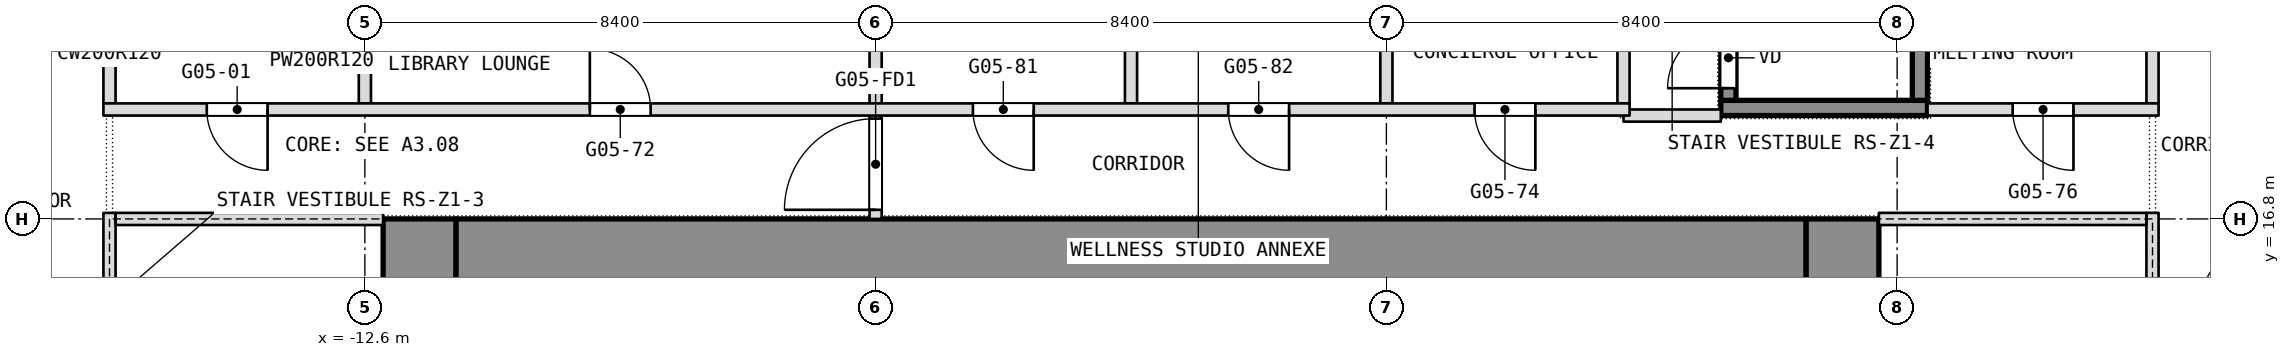
"""IFC4 building model, lengths in metres.
Left out: names, types, materials, properties, quantities, classifications, styles, units other than length and angle.
Written with IfcOpenShell. Run it as: python <this file> out.ifc"""

import sys

from ifc_helpers import new_model, si_unit, direction, frame, frame_2d, origin, place, context, subcontext, project, spatial, rectangle, extrude, element, fill, save


model = new_model("IFC4")
c1 = context("Model", 3, precision=1e-05, world=origin(), true_north=direction((0.0, 1.0)))
c2 = subcontext(c1, "Body", "Model", "MODEL_VIEW")
j1 = project(units=[si_unit("LENGTHUNIT", "METRE"), si_unit("PLANEANGLEUNIT", "RADIAN")], contexts=[c1])
p1 = place(None, origin())
s1 = spatial("IfcSite", under=j1, at=p1, CompositionType="ELEMENT")
p2 = place(p1, origin())
s2 = spatial("IfcBuilding", under=s1, at=p2, CompositionType="ELEMENT")
p3 = place(p2, frame((0.0, 0.0, 68.9)))
s3 = spatial("IfcBuildingStorey", under=s2, at=p3, CompositionType="ELEMENT", Elevation=68.9)
p4 = place(p3, frame((11.7, 0.0, 0.0), z_axis=(0.0, 0.0, 1.0), x_axis=(0.0, 1.0, 0.0)))
e1 = element("IfcWall", 1, at=p4, inside=s3, PredefinedType="SHEAR", context=c2, shape_type="SweptSolid", body=[
    extrude(rectangle(XDim=16.8, YDim=1.2, at=frame_2d((8.4, 0.0))), origin(), (0.0, 0.0, 1.0), 3.6),
])
p5 = place(p4, frame((3.6, 0.0, 0.0)))
e2 = element("IfcOpeningElement", 2, at=p5, cuts=e1, PredefinedType="OPENING", context=c2, shape_type="SweptSolid", body=[
    extrude(rectangle(XDim=0.9, YDim=2.1, at=frame_2d((0.45, 1.05))), frame((0.0, 0.6, 0.0), z_axis=(0.0, -1.0, 0.0), x_axis=(1.0, 0.0, 0.0)), (0.0, 0.0, 1.0), 1.2),
])
p6 = place(p4, frame((6.825, 0.0, 0.0)))
e3 = element("IfcOpeningElement", 3, at=p6, cuts=e1, PredefinedType="OPENING", context=c2, shape_type="SweptSolid", body=[
    extrude(rectangle(XDim=1.2, YDim=2.1, at=frame_2d((0.6, 1.05))), frame((0.0, 0.6, 0.0), z_axis=(0.0, -1.0, 0.0), x_axis=(1.0, 0.0, 0.0)), (0.0, 0.0, 1.0), 1.2),
])
p7 = place(p4, frame((14.137, 0.0, 0.0)))
e4 = element("IfcOpeningElement", 4, at=p7, cuts=e1, PredefinedType="OPENING", context=c2, shape_type="SweptSolid", body=[
    extrude(rectangle(XDim=0.9, YDim=2.1, at=frame_2d((0.45, 1.05))), frame((0.0, 0.6, 0.0), z_axis=(0.0, -1.0, 0.0), x_axis=(1.0, 0.0, 0.0)), (0.0, 0.0, 1.0), 1.2),
])
p8 = place(p4, frame((11.512, 0.0, 0.0)))
e5 = element("IfcOpeningElement", 5, at=p8, cuts=e1, PredefinedType="OPENING", context=c2, shape_type="SweptSolid", body=[
    extrude(rectangle(XDim=0.9, YDim=2.1, at=frame_2d((0.45, 1.05))), frame((0.0, 0.6, 0.0), z_axis=(0.0, -1.0, 0.0), x_axis=(1.0, 0.0, 0.0)), (0.0, 0.0, 1.0), 1.2),
])
p9 = place(p4, frame((8.775, 0.0, 0.0)))
e6 = element("IfcOpeningElement", 6, at=p9, cuts=e1, PredefinedType="OPENING", context=c2, shape_type="SweptSolid", body=[
    extrude(rectangle(XDim=1.2, YDim=2.1, at=frame_2d((0.6, 1.05))), frame((0.0, 0.6, 0.0), z_axis=(0.0, -1.0, 0.0), x_axis=(1.0, 0.0, 0.0)), (0.0, 0.0, 1.0), 1.2),
])
p10 = place(p3, frame((-11.7, 0.0, 0.0), z_axis=(0.0, 0.0, 1.0), x_axis=(0.0, 1.0, 0.0)))
e7 = element("IfcWall", 7, at=p10, inside=s3, PredefinedType="SHEAR", context=c2, shape_type="SweptSolid", body=[
    extrude(rectangle(XDim=16.8, YDim=1.2, at=frame_2d((8.4, 0.0))), origin(), (0.0, 0.0, 1.0), 3.6),
])
p11 = place(p10, frame((2.3, 0.0, 0.0)))
e8 = element("IfcOpeningElement", 8, at=p11, cuts=e7, PredefinedType="OPENING", context=c2, shape_type="SweptSolid", body=[
    extrude(rectangle(XDim=1.1, YDim=2.1, at=frame_2d((0.55, 1.05))), frame((0.0, 0.6, 0.0), z_axis=(0.0, -1.0, 0.0), x_axis=(1.0, 0.0, 0.0)), (0.0, 0.0, 1.0), 1.2),
])
p12 = place(p10, frame((4.85, 0.0, 0.0)))
e9 = element("IfcOpeningElement", 9, at=p12, cuts=e7, PredefinedType="OPENING", context=c2, shape_type="SweptSolid", body=[
    extrude(rectangle(XDim=1.1, YDim=2.1, at=frame_2d((0.55, 1.05))), frame((0.0, 0.6, 0.0), z_axis=(0.0, -1.0, 0.0), x_axis=(1.0, 0.0, 0.0)), (0.0, 0.0, 1.0), 1.2),
])
p13 = place(p10, frame((6.825, 0.0, 0.0)))
e10 = element("IfcOpeningElement", 10, at=p13, cuts=e7, PredefinedType="OPENING", context=c2, shape_type="SweptSolid", body=[
    extrude(rectangle(XDim=1.2, YDim=2.1, at=frame_2d((0.6, 1.05))), frame((0.0, 0.6, 0.0), z_axis=(0.0, -1.0, 0.0), x_axis=(1.0, 0.0, 0.0)), (0.0, 0.0, 1.0), 1.2),
])
p14 = place(p10, frame((13.4, 0.0, 0.0)))
e11 = element("IfcOpeningElement", 11, at=p14, cuts=e7, PredefinedType="OPENING", context=c2, shape_type="SweptSolid", body=[
    extrude(rectangle(XDim=1.1, YDim=2.1, at=frame_2d((0.55, 1.05))), frame((0.0, 0.6, 0.0), z_axis=(0.0, -1.0, 0.0), x_axis=(1.0, 0.0, 0.0)), (0.0, 0.0, 1.0), 1.2),
])
p15 = place(p10, frame((10.85, 0.0, 0.0)))
e12 = element("IfcOpeningElement", 12, at=p15, cuts=e7, PredefinedType="OPENING", context=c2, shape_type="SweptSolid", body=[
    extrude(rectangle(XDim=1.1, YDim=2.1, at=frame_2d((0.55, 1.05))), frame((0.0, 0.6, 0.0), z_axis=(0.0, -1.0, 0.0), x_axis=(1.0, 0.0, 0.0)), (0.0, 0.0, 1.0), 1.2),
])
p16 = place(p10, frame((8.775, 0.0, 0.0)))
e13 = element("IfcOpeningElement", 13, at=p16, cuts=e7, PredefinedType="OPENING", context=c2, shape_type="SweptSolid", body=[
    extrude(rectangle(XDim=1.2, YDim=2.1, at=frame_2d((0.6, 1.05))), frame((0.0, 0.6, 0.0), z_axis=(0.0, -1.0, 0.0), x_axis=(1.0, 0.0, 0.0)), (0.0, 0.0, 1.0), 1.2),
])
p17 = place(p3, frame((-11.1, 16.2, 0.0), z_axis=(0.0, 0.0, 1.0), x_axis=(1.0, 0.0, 0.0)))
e14 = element("IfcWall", 14, at=p17, inside=s3, PredefinedType="SHEAR", context=c2, shape_type="SweptSolid", body=[
    extrude(rectangle(XDim=22.2, YDim=1.2, at=frame_2d((11.1, 0.0))), origin(), (0.0, 0.0, 1.0), 3.6),
])
p18 = place(p3, frame((16.8, 18.7, 0.0), z_axis=(0.0, 0.0, 1.0), x_axis=(0.0, 1.0, 0.0)))
e15 = element("IfcWall", 15, at=p18, inside=s3, PredefinedType="PARTITIONING", context=c2, shape_type="SweptSolid", body=[
    extrude(rectangle(XDim=3.0, YDim=0.2, at=frame_2d((1.5, 0.0))), origin(), (0.0, 0.0, 1.0), 3.34),
])
for number, where, z_axis, x_axis in (
    (16, (8.1, 18.7, 0.0), (0.0, 0.0, 1.0), (0.0, 1.0, 0.0)),
    (17, (4.2, 18.7, 0.0), (0.0, 0.0, 1.0), (0.0, 1.0, 0.0)),
    (18, (0.0, 18.7, 0.0), (0.0, 0.0, 1.0), (0.0, 1.0, 0.0)),
):
    element("IfcWall", number, at=place(p3, frame(where, z_axis=z_axis, x_axis=x_axis)), inside=s3, PredefinedType="PARTITIONING", context=c2, shape_type="SweptSolid", body=[
        extrude(rectangle(XDim=2.8, YDim=0.2, at=frame_2d((1.4, 0.0))), origin(), (0.0, 0.0, 1.0), 3.34),
    ])
p19 = place(p3, frame((-4.2, 16.8, 0.0), z_axis=(0.0, 0.0, 1.0), x_axis=(0.0, 1.0, 0.0)))
e19 = element("IfcWall", 19, at=p19, inside=s3, PredefinedType="PARTITIONING", context=c2, shape_type="SweptSolid", body=[
    extrude(rectangle(XDim=6.7, YDim=0.2, at=frame_2d((3.35, 0.0))), origin(), (0.0, 0.0, 1.0), 3.34),
])
p20 = place(p19, frame((0.15, 0.0, 0.0)))
e20 = element("IfcOpeningElement", 20, at=p20, cuts=e19, PredefinedType="OPENING", context=c2, shape_type="SweptSolid", body=[
    extrude(rectangle(XDim=1.5, YDim=2.1, at=frame_2d((0.75, 1.05))), frame((0.0, 0.1, 0.0), z_axis=(0.0, -1.0, 0.0), x_axis=(1.0, 0.0, 0.0)), (0.0, 0.0, 1.0), 0.2),
])
p21 = place(p19, frame((4.95, 0.0, 0.0)))
e21 = element("IfcOpeningElement", 21, at=p21, cuts=e19, PredefinedType="OPENING", context=c2, shape_type="SweptSolid", body=[
    extrude(rectangle(XDim=1.5, YDim=2.1, at=frame_2d((0.75, 1.05))), frame((0.0, 0.1, 0.0), z_axis=(0.0, -1.0, 0.0), x_axis=(1.0, 0.0, 0.0)), (0.0, 0.0, 1.0), 0.2),
])
p22 = place(p3, frame((-12.6, 18.7, 0.0), z_axis=(0.0, 0.0, 1.0), x_axis=(0.0, 1.0, 0.0)))
e22 = element("IfcWall", 22, at=p22, inside=s3, PredefinedType="PARTITIONING", context=c2, shape_type="SweptSolid", body=[
    extrude(rectangle(XDim=2.8, YDim=0.2, at=frame_2d((1.4, 0.0))), origin(), (0.0, 0.0, 1.0), 3.34),
])
p23 = place(p3, frame((-16.8, 18.7, 0.0), z_axis=(0.0, 0.0, 1.0), x_axis=(0.0, 1.0, 0.0)))
e23 = element("IfcWall", 23, at=p23, inside=s3, PredefinedType="PARTITIONING", context=c2, shape_type="SweptSolid", body=[
    extrude(rectangle(XDim=3.0, YDim=0.2, at=frame_2d((1.5, 0.0))), origin(), (0.0, 0.0, 1.0), 3.34),
])
p24 = place(p3, frame((8.1, 18.5, 0.0), z_axis=(0.0, 0.0, 1.0), x_axis=(1.0, 0.0, 0.0)))
e24 = element("IfcWall", 24, at=p24, inside=s3, PredefinedType="PARTITIONING", context=c2, shape_type="SweptSolid", body=[
    extrude(rectangle(XDim=1.6, YDim=0.2, at=frame_2d((0.8, 0.0))), origin(), (0.0, 0.0, 1.0), 3.34),
])
p25 = place(p3, frame((-16.9, 18.6, 0.0), z_axis=(0.0, 0.0, 1.0), x_axis=(1.0, 0.0, 0.0)))
e25 = element("IfcWall", 25, at=p25, inside=s3, PredefinedType="PARTITIONING", context=c2, shape_type="SweptSolid", body=[
    extrude(rectangle(XDim=25.1, YDim=0.2, at=frame_2d((12.55, 0.0))), origin(), (0.0, 0.0, 1.0), 3.34),
])
p26 = place(p25, frame((1.7, 0.0, 0.0)))
e26 = element("IfcOpeningElement", 26, at=p26, cuts=e25, PredefinedType="OPENING", context=c2, shape_type="SweptSolid", body=[
    extrude(rectangle(XDim=1.0, YDim=2.1, at=frame_2d((0.5, 1.05))), frame((0.0, 0.1, 0.0), z_axis=(0.0, -1.0, 0.0), x_axis=(1.0, 0.0, 0.0)), (0.0, 0.0, 1.0), 0.2),
])
p27 = place(p25, frame((8.0, 0.0, 0.0)))
e27 = element("IfcOpeningElement", 27, at=p27, cuts=e25, PredefinedType="OPENING", context=c2, shape_type="SweptSolid", body=[
    extrude(rectangle(XDim=1.0, YDim=2.1, at=frame_2d((0.5, 1.05))), frame((0.0, 0.1, 0.0), z_axis=(0.0, -1.0, 0.0), x_axis=(1.0, 0.0, 0.0)), (0.0, 0.0, 1.0), 0.2),
])
p28 = place(p25, frame((22.55, 0.0, 0.0)))
e28 = element("IfcOpeningElement", 28, at=p28, cuts=e25, PredefinedType="OPENING", context=c2, shape_type="SweptSolid", body=[
    extrude(rectangle(XDim=1.0, YDim=2.1, at=frame_2d((0.5, 1.05))), frame((0.0, 0.1, 0.0), z_axis=(0.0, -1.0, 0.0), x_axis=(1.0, 0.0, 0.0)), (0.0, 0.0, 1.0), 0.2),
])
p29 = place(p25, frame((14.3, 0.0, 0.0)))
e29 = element("IfcOpeningElement", 29, at=p29, cuts=e25, PredefinedType="OPENING", context=c2, shape_type="SweptSolid", body=[
    extrude(rectangle(XDim=1.0, YDim=2.1, at=frame_2d((0.5, 1.05))), frame((0.0, 0.1, 0.0), z_axis=(0.0, -1.0, 0.0), x_axis=(1.0, 0.0, 0.0)), (0.0, 0.0, 1.0), 0.2),
])
p30 = place(p25, frame((18.5, 0.0, 0.0)))
e30 = element("IfcOpeningElement", 30, at=p30, cuts=e25, PredefinedType="OPENING", context=c2, shape_type="SweptSolid", body=[
    extrude(rectangle(XDim=1.0, YDim=2.1, at=frame_2d((0.5, 1.05))), frame((0.0, 0.1, 0.0), z_axis=(0.0, -1.0, 0.0), x_axis=(1.0, 0.0, 0.0)), (0.0, 0.0, 1.0), 0.2),
])
p31 = place(p3, frame((13.1, 18.6, 0.0), z_axis=(0.0, 0.0, 1.0), x_axis=(1.0, 0.0, 0.0)))
e31 = element("IfcWall", 31, at=p31, inside=s3, PredefinedType="PARTITIONING", context=c2, shape_type="SweptSolid", body=[
    extrude(rectangle(XDim=3.8, YDim=0.2, at=frame_2d((1.9, 0.0))), origin(), (0.0, 0.0, 1.0), 3.34),
])
p32 = place(p31, frame((1.4, 0.0, 0.0)))
e32 = element("IfcOpeningElement", 32, at=p32, cuts=e31, PredefinedType="OPENING", context=c2, shape_type="SweptSolid", body=[
    extrude(rectangle(XDim=1.0, YDim=2.1, at=frame_2d((0.5, 1.05))), frame((0.0, 0.1, 0.0), z_axis=(0.0, -1.0, 0.0), x_axis=(1.0, 0.0, 0.0)), (0.0, 0.0, 1.0), 0.2),
])
p33 = place(p3, frame((-16.8, -0.1, 0.0), z_axis=(0.0, 0.0, 1.0), x_axis=(0.0, 1.0, 0.0)))
e33 = element("IfcWall", 33, at=p33, inside=s3, PredefinedType="PARTITIONING", context=c2, shape_type="SweptSolid", body=[
    extrude(rectangle(XDim=17.0, YDim=0.2, at=frame_2d((8.5, 0.0))), origin(), (0.0, 0.0, 1.0), 3.34),
])
p34 = place(p33, frame((2.2, 0.0, 0.0)))
e34 = element("IfcOpeningElement", 34, at=p34, cuts=e33, PredefinedType="OPENING", context=c2, shape_type="SweptSolid", body=[
    extrude(rectangle(XDim=1.8, YDim=2.1, at=frame_2d((0.9, 1.05))), frame((0.0, 0.1, 0.0), z_axis=(0.0, -1.0, 0.0), x_axis=(1.0, 0.0, 0.0)), (0.0, 0.0, 1.0), 0.2),
])
p35 = place(p33, frame((7.2, 0.0, 0.0)))
e35 = element("IfcOpeningElement", 35, at=p35, cuts=e33, PredefinedType="OPENING", context=c2, shape_type="SweptSolid", body=[
    extrude(rectangle(XDim=1.8, YDim=2.1, at=frame_2d((0.9, 1.05))), frame((0.0, 0.1, 0.0), z_axis=(0.0, -1.0, 0.0), x_axis=(1.0, 0.0, 0.0)), (0.0, 0.0, 1.0), 0.2),
])
p36 = place(p3, frame((-16.7, 16.8, 0.0), z_axis=(0.0, 0.0, 1.0), x_axis=(1.0, 0.0, 0.0)))
e36 = element("IfcWall", 36, at=p36, inside=s3, PredefinedType="PARTITIONING", context=c2, shape_type="SweptSolid", body=[
    extrude(rectangle(XDim=4.4, YDim=0.2, at=frame_2d((2.2, 0.0))), origin(), (0.0, 0.0, 1.0), 2.84),
])
p37 = place(p3, frame((16.8, -0.1, 0.0), z_axis=(0.0, 0.0, 1.0), x_axis=(0.0, 1.0, 0.0)))
e37 = element("IfcWall", 37, at=p37, inside=s3, PredefinedType="PARTITIONING", context=c2, shape_type="SweptSolid", body=[
    extrude(rectangle(XDim=17.0, YDim=0.2, at=frame_2d((8.5, 0.0))), origin(), (0.0, 0.0, 1.0), 3.34),
])
p38 = place(p37, frame((2.2, 0.0, 0.0)))
e38 = element("IfcOpeningElement", 38, at=p38, cuts=e37, PredefinedType="OPENING", context=c2, shape_type="SweptSolid", body=[
    extrude(rectangle(XDim=1.8, YDim=2.1, at=frame_2d((0.9, 1.05))), frame((0.0, 0.1, 0.0), z_axis=(0.0, -1.0, 0.0), x_axis=(1.0, 0.0, 0.0)), (0.0, 0.0, 1.0), 0.2),
])
p39 = place(p37, frame((13.0, 0.0, 0.0)))
e39 = element("IfcOpeningElement", 39, at=p39, cuts=e37, PredefinedType="OPENING", context=c2, shape_type="SweptSolid", body=[
    extrude(rectangle(XDim=1.8, YDim=2.1, at=frame_2d((0.9, 1.05))), frame((0.0, 0.1, 0.0), z_axis=(0.0, -1.0, 0.0), x_axis=(1.0, 0.0, 0.0)), (0.0, 0.0, 1.0), 0.2),
])
p40 = place(p3, frame((12.3, 16.8, 0.0), z_axis=(0.0, 0.0, 1.0), x_axis=(1.0, 0.0, 0.0)))
e40 = element("IfcWall", 40, at=p40, inside=s3, PredefinedType="PARTITIONING", context=c2, shape_type="SweptSolid", body=[
    extrude(rectangle(XDim=4.4, YDim=0.2, at=frame_2d((2.2, 0.0))), origin(), (0.0, 0.0, 1.0), 2.84),
])
p41 = place(p3, frame((9.7, 18.625, 0.1), z_axis=(0.0, 0.0, 1.0), x_axis=(1.0, 0.0, 0.0)))
e41 = element("IfcWall", 41, at=p41, inside=s3, PredefinedType="SHEAR", context=c2, shape_type="SweptSolid", body=[
    extrude(rectangle(XDim=3.4, YDim=0.25, at=frame_2d((1.7, 0.0))), origin(), (0.0, 0.0, 1.0), 3.6),
])
p42 = place(p3, frame((9.825, 18.75, 0.1), z_axis=(0.0, 0.0, 1.0), x_axis=(0.0, 1.0, 0.0)))
e42 = element("IfcWall", 42, at=p42, inside=s3, PredefinedType="SHEAR", context=c2, shape_type="SweptSolid", body=[
    extrude(rectangle(XDim=5.7, YDim=0.25, at=frame_2d((2.85, 0.0))), origin(), (0.0, 0.0, 1.0), 3.6),
])
p43 = place(p42, frame((0.2, 0.0, 0.0)))
e43 = element("IfcOpeningElement", 43, at=p43, cuts=e42, PredefinedType="OPENING", context=c2, shape_type="SweptSolid", body=[
    extrude(rectangle(XDim=1.0, YDim=2.1, at=frame_2d((0.5, 1.05))), frame((0.0, 0.125, 0.0), z_axis=(0.0, -1.0, 0.0), x_axis=(1.0, 0.0, 0.0)), (0.0, 0.0, 1.0), 0.25),
])
p44 = place(p3, frame((12.975, 18.75, 0.1), z_axis=(0.0, 0.0, 1.0), x_axis=(0.0, 1.0, 0.0)))
e44 = element("IfcWall", 44, at=p44, inside=s3, PredefinedType="SHEAR", context=c2, shape_type="SweptSolid", body=[
    extrude(rectangle(XDim=5.7, YDim=0.25, at=frame_2d((2.85, 0.0))), origin(), (0.0, 0.0, 1.0), 3.6),
])
p45 = place(p26, origin())
e45 = element("IfcDoor", 45, at=p45, inside=s3, OperationType="SINGLE_SWING_RIGHT", PredefinedType="DOOR", context=c2, shape_type="SweptSolid", body=[
    extrude(rectangle(XDim=1.0, YDim=2.1, at=frame_2d((0.5, 1.05))), frame((0.0, 0.025, 0.0), z_axis=(0.0, -1.0, 0.0), x_axis=(1.0, 0.0, 0.0)), (0.0, 0.0, 1.0), 0.05),
])
fill(e26, e45)
p46 = place(p27, origin())
e46 = element("IfcDoor", 46, at=p46, inside=s3, OperationType="SINGLE_SWING_RIGHT", PredefinedType="DOOR", context=c2, shape_type="SweptSolid", body=[
    extrude(rectangle(XDim=1.0, YDim=2.1, at=frame_2d((0.5, 1.05))), frame((0.0, 0.025, 0.0), z_axis=(0.0, -1.0, 0.0), x_axis=(1.0, 0.0, 0.0)), (0.0, 0.0, 1.0), 0.05),
])
fill(e27, e46)
p47 = place(p28, origin())
e47 = element("IfcDoor", 47, at=p47, inside=s3, OperationType="SINGLE_SWING_RIGHT", PredefinedType="DOOR", context=c2, shape_type="SweptSolid", body=[
    extrude(rectangle(XDim=1.0, YDim=2.1, at=frame_2d((0.5, 1.05))), frame((0.0, 0.025, 0.0), z_axis=(0.0, -1.0, 0.0), x_axis=(1.0, 0.0, 0.0)), (0.0, 0.0, 1.0), 0.05),
])
fill(e28, e47)
p48 = place(p29, origin())
e48 = element("IfcDoor", 48, at=p48, inside=s3, OperationType="SINGLE_SWING_LEFT", PredefinedType="DOOR", context=c2, shape_type="SweptSolid", body=[
    extrude(rectangle(XDim=1.0, YDim=2.1, at=frame_2d((0.5, 1.05))), frame((0.0, 0.025, 0.0), z_axis=(0.0, -1.0, 0.0), x_axis=(1.0, 0.0, 0.0)), (0.0, 0.0, 1.0), 0.05),
])
fill(e29, e48)
p49 = place(p30, origin())
e49 = element("IfcDoor", 49, at=p49, inside=s3, OperationType="SINGLE_SWING_RIGHT", PredefinedType="DOOR", context=c2, shape_type="SweptSolid", body=[
    extrude(rectangle(XDim=1.0, YDim=2.1, at=frame_2d((0.5, 1.05))), frame((0.0, 0.025, 0.0), z_axis=(0.0, -1.0, 0.0), x_axis=(1.0, 0.0, 0.0)), (0.0, 0.0, 1.0), 0.05),
])
fill(e30, e49)
p50 = place(p32, origin())
e50 = element("IfcDoor", 50, at=p50, inside=s3, OperationType="SINGLE_SWING_LEFT", PredefinedType="DOOR", context=c2, shape_type="SweptSolid", body=[
    extrude(rectangle(XDim=1.0, YDim=2.1, at=frame_2d((0.5, 1.05))), frame((0.0, 0.025, 0.0), z_axis=(0.0, -1.0, 0.0), x_axis=(1.0, 0.0, 0.0)), (0.0, 0.0, 1.0), 0.05),
])
fill(e32, e50)
p51 = place(p43, origin())
e51 = element("IfcDoor", 51, at=p51, inside=s3, OperationType="SINGLE_SWING_LEFT", PredefinedType="DOOR", context=c2, shape_type="SweptSolid", body=[
    extrude(rectangle(XDim=1.0, YDim=2.1, at=frame_2d((0.5, 1.05))), frame((0.0, 0.025, 0.0), z_axis=(0.0, -1.0, 0.0), x_axis=(1.0, 0.0, 0.0)), (0.0, 0.0, 1.0), 0.05),
])
fill(e43, e51)
p52 = place(p20, origin())
e52 = element("IfcDoor", 52, at=p52, inside=s3, OperationType="DOUBLE_DOOR_DOUBLE_SWING", PredefinedType="DOOR", context=c2, shape_type="SweptSolid", body=[
    extrude(rectangle(XDim=1.5, YDim=2.1, at=frame_2d((0.75, 1.05))), frame((0.0, 0.025, 0.0), z_axis=(0.0, -1.0, 0.0), x_axis=(1.0, 0.0, 0.0)), (0.0, 0.0, 1.0), 0.05),
])
fill(e20, e52)
save(model, sys.argv[1])
